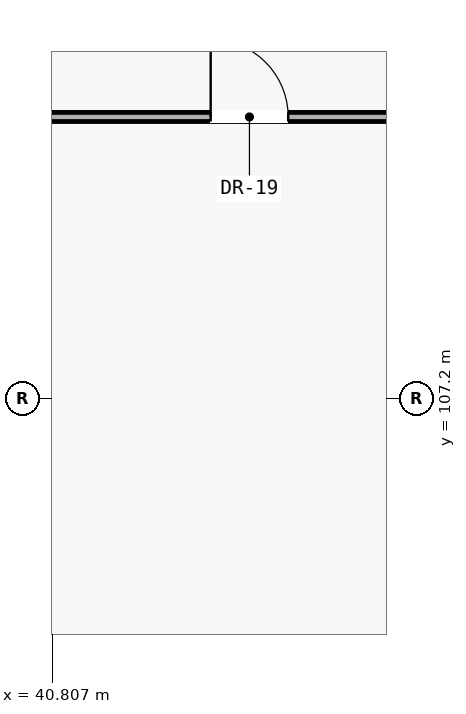
"""IFC4 building model, lengths in metres.
Left out: names, types, materials, properties, quantities, classifications, styles, units other than length and angle.
Written with IfcOpenShell. Run it as: python <this file> out.ifc"""

import sys

from ifc_helpers import new_model, si_unit, direction, frame, frame_2d, origin, place, context, subcontext, project, spatial, rectangle, extrude, element, fill, save


model = new_model("IFC4")
c1 = context("Model", 3, precision=1e-05, world=origin(), true_north=direction((0.0, 1.0)))
c2 = subcontext(c1, "Body", "Model", "MODEL_VIEW")
j1 = project(units=[si_unit("LENGTHUNIT", "METRE"), si_unit("PLANEANGLEUNIT", "RADIAN")], contexts=[c1])
p1 = place(None, origin())
s1 = spatial("IfcSite", under=j1, at=p1, CompositionType="ELEMENT")
p2 = place(p1, origin())
s2 = spatial("IfcBuilding", under=s1, at=p2, CompositionType="ELEMENT")
p3 = place(p2, frame((0.0, 0.0, 17.85)))
s3 = spatial("IfcBuildingStorey", under=s2, at=p3, CompositionType="ELEMENT", Elevation=17.85)
p4 = place(p3, frame((29.2, 110.9, 0.0), z_axis=(0.0, 0.0, 1.0), x_axis=(1.0, 0.0, 0.0)))
e1 = element("IfcWall", 1, at=p4, inside=s3, PredefinedType="PARTITIONING", context=c2, shape_type="SweptSolid", body=[
    extrude(rectangle(XDim=28.4, YDim=0.12, at=frame_2d((14.2, 0.0))), origin(), (0.0, 0.0, 1.0), 3.99),
])
p5 = place(p4, frame((13.69, 0.0, 0.0)))
e2 = element("IfcOpeningElement", 2, at=p5, cuts=e1, PredefinedType="OPENING", context=c2, shape_type="SweptSolid", body=[
    extrude(rectangle(XDim=1.02, YDim=2.1, at=frame_2d((0.51, 1.05))), frame((0.0, 0.07, 0.0), z_axis=(0.0, -1.0, 0.0), x_axis=(1.0, 0.0, 0.0)), (0.0, 0.0, 1.0), 0.14),
])
p6 = place(p5, origin())
e3 = element("IfcDoor", 3, at=p6, inside=s3, OperationType="SINGLE_SWING_LEFT", PredefinedType="DOOR", context=c2, shape_type="SweptSolid", body=[
    extrude(rectangle(XDim=1.02, YDim=2.1, at=frame_2d((0.51, 1.05))), frame((0.0, 0.025, 0.0), z_axis=(0.0, -1.0, 0.0), x_axis=(1.0, 0.0, 0.0)), (0.0, 0.0, 1.0), 0.05),
])
fill(e2, e3)
save(model, sys.argv[1])
